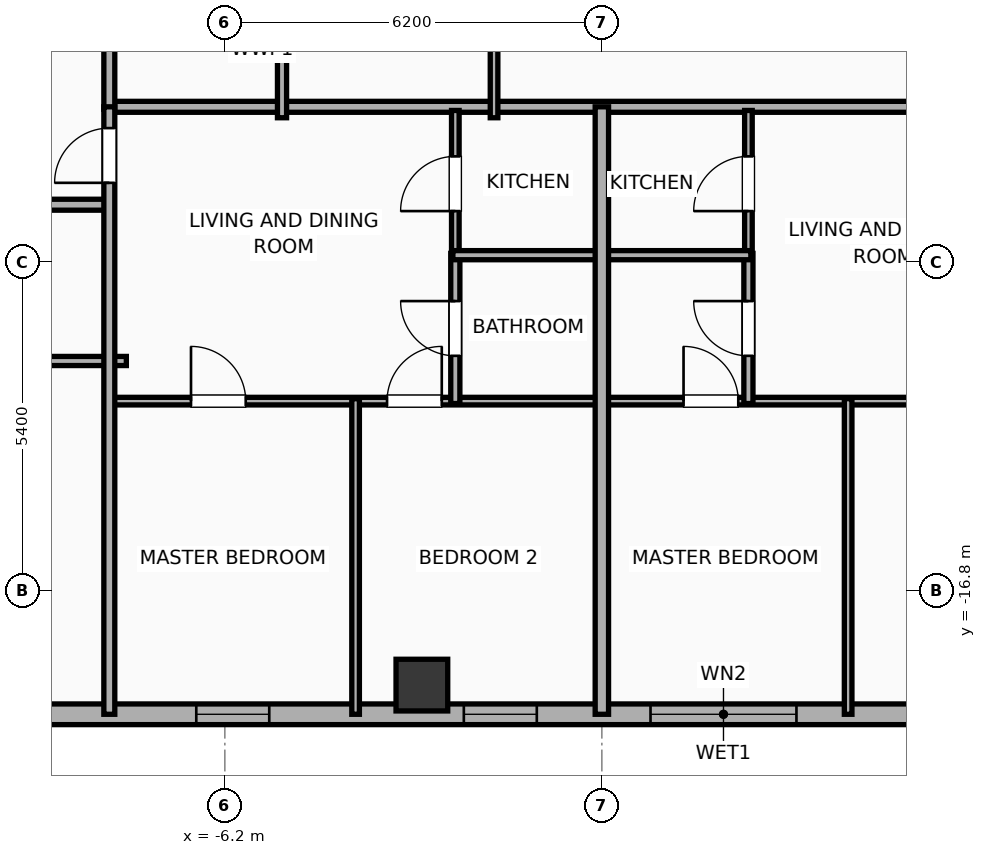
"""IFC4 building model, lengths in metres.
Left out: names, types, materials, properties, quantities, classifications, styles, units other than length and angle.
Written with IfcOpenShell. Run it as: python <this file> out.ifc"""

import sys

from ifc_helpers import new_model, si_unit, direction, frame, frame_2d, origin, origin_2d, place, context, subcontext, project, spatial, rectangle, hollow_rectangle, extrude, element, fill, save


model = new_model("IFC4")
c1 = context("Model", 3, precision=1e-05, world=origin(), true_north=direction((0.0, 1.0)))
c2 = subcontext(c1, "Body", "Model", "MODEL_VIEW")
j1 = project(units=[si_unit("LENGTHUNIT", "METRE"), si_unit("PLANEANGLEUNIT", "RADIAN")], contexts=[c1])
p1 = place(None, origin())
s1 = spatial("IfcSite", under=j1, at=p1, CompositionType="ELEMENT")
p2 = place(p1, origin())
s2 = spatial("IfcBuilding", under=s1, at=p2, CompositionType="ELEMENT")
p3 = place(p2, frame((0.0, 0.0, 227.5)))
s3 = spatial("IfcBuildingStorey", under=s2, at=p3, CompositionType="ELEMENT", Elevation=227.5)
p4 = place(p3, frame((-2.96, -18.35, 0.0), z_axis=(0.0, 0.0, 1.0), x_axis=(1.0, 0.0, 0.0)))
e1 = element("IfcColumn", 1, at=p4, inside=s3, PredefinedType="COLUMN", context=c2, shape_type="SweptSolid", body=[
    extrude(hollow_rectangle(XDim=0.85, YDim=0.85, WallThickness=0.028, at=origin_2d()), origin(), (0.0, 0.0, 1.0), 3.9),
])
p5 = place(p3, frame((26.783, -18.83, 0.0), z_axis=(0.0, 0.0, 1.0), x_axis=(-1.0, 0.0, 0.0)))
e2 = element("IfcWall", 2, at=p5, inside=s3, PredefinedType="ELEMENTEDWALL", context=c2, shape_type="SweptSolid", body=[
    extrude(rectangle(XDim=49.566, YDim=0.34, at=frame_2d((24.783, 0.0))), origin(), (0.0, 0.0, 1.0), 3.65),
])
p6 = place(p5, frame((23.583, 0.0, 0.75)))
e3 = element("IfcOpeningElement", 3, at=p6, cuts=e2, PredefinedType="OPENING", context=c2, shape_type="SweptSolid", body=[
    extrude(rectangle(XDim=2.4, YDim=2.1, at=frame_2d((1.2, 1.05))), frame((0.0, 0.18, 0.0), z_axis=(0.0, -1.0, 0.0), x_axis=(1.0, 0.0, 0.0)), (0.0, 0.0, 1.0), 0.36),
])
p7 = place(p5, frame((41.756, 0.0, 0.75)))
e4 = element("IfcOpeningElement", 4, at=p7, cuts=e2, PredefinedType="OPENING", context=c2, shape_type="SweptSolid", body=[
    extrude(rectangle(XDim=2.4, YDim=2.1, at=frame_2d((1.2, 1.05))), frame((0.0, 0.18, 0.0), z_axis=(0.0, -1.0, 0.0), x_axis=(1.0, 0.0, 0.0)), (0.0, 0.0, 1.0), 0.36),
])
p8 = place(p5, frame((47.222, 0.0, 0.75)))
e5 = element("IfcOpeningElement", 5, at=p8, cuts=e2, PredefinedType="OPENING", context=c2, shape_type="SweptSolid", body=[
    extrude(rectangle(XDim=1.2, YDim=2.05, at=frame_2d((0.6, 1.025))), frame((0.0, 0.18, 0.0), z_axis=(0.0, -1.0, 0.0), x_axis=(1.0, 0.0, 0.0)), (0.0, 0.0, 1.0), 0.36),
])
p9 = place(p5, frame((45.181, 0.0, 0.75)))
e6 = element("IfcOpeningElement", 6, at=p9, cuts=e2, PredefinedType="OPENING", context=c2, shape_type="SweptSolid", body=[
    extrude(rectangle(XDim=1.2, YDim=2.05, at=frame_2d((0.6, 1.025))), frame((0.0, 0.18, 0.0), z_axis=(0.0, -1.0, 0.0), x_axis=(1.0, 0.0, 0.0)), (0.0, 0.0, 1.0), 0.36),
])
p10 = place(p5, frame((37.289, 0.0, 0.75)))
e7 = element("IfcOpeningElement", 7, at=p10, cuts=e2, PredefinedType="OPENING", context=c2, shape_type="SweptSolid", body=[
    extrude(rectangle(XDim=1.2, YDim=2.05, at=frame_2d((0.6, 1.025))), frame((0.0, 0.18, 0.0), z_axis=(0.0, -1.0, 0.0), x_axis=(1.0, 0.0, 0.0)), (0.0, 0.0, 1.0), 0.36),
])
p11 = place(p5, frame((16.115, 0.0, 0.75)))
e8 = element("IfcOpeningElement", 8, at=p11, cuts=e2, PredefinedType="OPENING", context=c2, shape_type="SweptSolid", body=[
    extrude(rectangle(XDim=1.2, YDim=2.05, at=frame_2d((0.6, 1.025))), frame((0.0, 0.18, 0.0), z_axis=(0.0, -1.0, 0.0), x_axis=(1.0, 0.0, 0.0)), (0.0, 0.0, 1.0), 0.36),
])
p12 = place(p5, frame((12.422, 0.0, 0.75)))
e9 = element("IfcOpeningElement", 9, at=p12, cuts=e2, PredefinedType="OPENING", context=c2, shape_type="SweptSolid", body=[
    extrude(rectangle(XDim=1.2, YDim=2.05, at=frame_2d((0.6, 1.025))), frame((0.0, 0.18, 0.0), z_axis=(0.0, -1.0, 0.0), x_axis=(1.0, 0.0, 0.0)), (0.0, 0.0, 1.0), 0.36),
])
p13 = place(p5, frame((8.09, 0.0, 0.75)))
e10 = element("IfcOpeningElement", 10, at=p13, cuts=e2, PredefinedType="OPENING", context=c2, shape_type="SweptSolid", body=[
    extrude(rectangle(XDim=1.2, YDim=2.05, at=frame_2d((0.6, 1.025))), frame((0.0, 0.18, 0.0), z_axis=(0.0, -1.0, 0.0), x_axis=(1.0, 0.0, 0.0)), (0.0, 0.0, 1.0), 0.36),
])
p14 = place(p5, frame((4.637, 0.0, 0.75)))
e11 = element("IfcOpeningElement", 11, at=p14, cuts=e2, PredefinedType="OPENING", context=c2, shape_type="SweptSolid", body=[
    extrude(rectangle(XDim=1.2, YDim=2.05, at=frame_2d((0.6, 1.025))), frame((0.0, 0.18, 0.0), z_axis=(0.0, -1.0, 0.0), x_axis=(1.0, 0.0, 0.0)), (0.0, 0.0, 1.0), 0.36),
])
p15 = place(p5, frame((1.811, 0.0, 0.75)))
e12 = element("IfcOpeningElement", 12, at=p15, cuts=e2, PredefinedType="OPENING", context=c2, shape_type="SweptSolid", body=[
    extrude(rectangle(XDim=1.2, YDim=2.05, at=frame_2d((0.6, 1.025))), frame((0.0, 0.18, 0.0), z_axis=(0.0, -1.0, 0.0), x_axis=(1.0, 0.0, 0.0)), (0.0, 0.0, 1.0), 0.36),
])
p16 = place(p5, frame((32.253, 0.0, 0.75)))
e13 = element("IfcOpeningElement", 13, at=p16, cuts=e2, PredefinedType="OPENING", context=c2, shape_type="SweptSolid", body=[
    extrude(rectangle(XDim=1.2, YDim=2.05, at=frame_2d((0.6, 1.025))), frame((0.0, 0.18, 0.0), z_axis=(0.0, -1.0, 0.0), x_axis=(1.0, 0.0, 0.0)), (0.0, 0.0, 1.0), 0.36),
])
p17 = place(p5, frame((27.853, 0.0, 0.75)))
e14 = element("IfcOpeningElement", 14, at=p17, cuts=e2, PredefinedType="OPENING", context=c2, shape_type="SweptSolid", body=[
    extrude(rectangle(XDim=1.2, YDim=2.05, at=frame_2d((0.6, 1.025))), frame((0.0, 0.18, 0.0), z_axis=(0.0, -1.0, 0.0), x_axis=(1.0, 0.0, 0.0)), (0.0, 0.0, 1.0), 0.36),
])
p18 = place(p5, frame((20.473, 0.0, 0.75)))
e15 = element("IfcOpeningElement", 15, at=p18, cuts=e2, PredefinedType="OPENING", context=c2, shape_type="SweptSolid", body=[
    extrude(rectangle(XDim=1.2, YDim=2.05, at=frame_2d((0.6, 1.025))), frame((0.0, 0.18, 0.0), z_axis=(0.0, -1.0, 0.0), x_axis=(1.0, 0.0, 0.0)), (0.0, 0.0, 1.0), 0.36),
])
p19 = place(p3, frame((-8.15, -8.84, 0.0), z_axis=(0.0, 0.0, 1.0), x_axis=(1.0, 0.0, 0.0)))
e16 = element("IfcWall", 16, at=p19, inside=s3, PredefinedType="PARTITIONING", context=c2, shape_type="SweptSolid", body=[
    extrude(rectangle(XDim=16.3, YDim=0.18, at=frame_2d((8.15, 0.0))), origin(), (0.0, 0.0, 1.0), 3.65),
])
p20 = place(p3, frame((-8.1, -8.88, 0.0), z_axis=(0.0, 0.0, 1.0), x_axis=(0.0, 1.0, 0.0)))
e17 = element("IfcWall", 17, at=p20, inside=s3, PredefinedType="PARTITIONING", context=c2, shape_type="SweptSolid", body=[
    extrude(rectangle(XDim=17.76, YDim=0.18, at=frame_2d((8.88, 0.0))), origin(), (0.0, 0.0, 1.0), 3.65),
])
p21 = place(p20, frame((1.276, 0.0, 0.0)))
e18 = element("IfcOpeningElement", 18, at=p21, cuts=e17, PredefinedType="OPENING", context=c2, shape_type="SweptSolid", body=[
    extrude(rectangle(XDim=1.0, YDim=2.05, at=frame_2d((0.5, 1.025))), frame((0.0, 0.1, 0.0), z_axis=(0.0, -1.0, 0.0), x_axis=(1.0, 0.0, 0.0)), (0.0, 0.0, 1.0), 0.2),
])
p22 = place(p20, frame((10.181, 0.0, 0.0)))
e19 = element("IfcOpeningElement", 19, at=p22, cuts=e17, PredefinedType="OPENING", context=c2, shape_type="SweptSolid", body=[
    extrude(rectangle(XDim=0.95, YDim=2.05, at=frame_2d((0.475, 1.025))), frame((0.0, 0.1, 0.0), z_axis=(0.0, -1.0, 0.0), x_axis=(1.0, 0.0, 0.0)), (0.0, 0.0, 1.0), 0.2),
])
p23 = place(p3, frame((-5.26, -9.02, 0.0), z_axis=(0.0, 0.0, 1.0), x_axis=(0.0, 1.0, 0.0)))
e20 = element("IfcWall", 20, at=p23, inside=s3, PredefinedType="PLUMBINGWALL", context=c2, shape_type="SweptSolid", body=[
    extrude(rectangle(XDim=3.35, YDim=0.15, at=frame_2d((1.675, 0.0))), origin(), (0.0, 0.0, 1.0), 3.65),
])
p24 = place(p3, frame((-1.773, -9.02, 0.0), z_axis=(0.0, 0.0, 1.0), x_axis=(0.0, 1.0, 0.0)))
e21 = element("IfcWall", 21, at=p24, inside=s3, PredefinedType="PARTITIONING", context=c2, shape_type="SweptSolid", body=[
    extrude(rectangle(XDim=17.99, YDim=0.125, at=frame_2d((8.995, 0.0))), origin(), (0.0, 0.0, 1.0), 3.65),
])
p25 = place(p24, frame((8.52, 0.0, 0.0)))
e22 = element("IfcOpeningElement", 22, at=p25, cuts=e21, PredefinedType="OPENING", context=c2, shape_type="SweptSolid", body=[
    extrude(rectangle(XDim=0.95, YDim=2.05, at=frame_2d((0.475, 1.025))), frame((0.0, 0.073, 0.0), z_axis=(0.0, -1.0, 0.0), x_axis=(1.0, 0.0, 0.0)), (0.0, 0.0, 1.0), 0.145),
])
p26 = place(p3, frame((-10.217, -13.02, 0.0), z_axis=(0.0, 0.0, 1.0), x_axis=(1.0, 0.0, 0.0)))
e23 = element("IfcWall", 23, at=p26, inside=s3, PredefinedType="PLUMBINGWALL", context=c2, shape_type="SweptSolid", body=[
    extrude(rectangle(XDim=2.397, YDim=0.15, at=frame_2d((1.198, 0.0))), origin(), (0.0, 0.0, 1.0), 3.65),
])
p27 = place(p3, frame((-26.23, -10.45, 0.0), z_axis=(0.0, 0.0, 1.0), x_axis=(1.0, 0.0, 0.0)))
e24 = element("IfcWall", 24, at=p27, inside=s3, PredefinedType="PARTITIONING", context=c2, shape_type="SweptSolid", body=[
    extrude(rectangle(XDim=18.15, YDim=0.18, at=frame_2d((9.075, 0.0))), origin(), (0.0, 0.0, 1.0), 3.65),
])
p28 = place(p27, frame((2.659, 0.0, 0.0)))
e25 = element("IfcOpeningElement", 25, at=p28, cuts=e24, PredefinedType="OPENING", context=c2, shape_type="SweptSolid", body=[
    extrude(rectangle(XDim=0.9, YDim=2.05, at=frame_2d((0.45, 1.025))), frame((0.0, 0.1, 0.0), z_axis=(0.0, -1.0, 0.0), x_axis=(1.0, 0.0, 0.0)), (0.0, 0.0, 1.0), 0.2),
])
p29 = place(p27, frame((9.654, 0.0, 0.0)))
e26 = element("IfcOpeningElement", 26, at=p29, cuts=e24, PredefinedType="OPENING", context=c2, shape_type="SweptSolid", body=[
    extrude(rectangle(XDim=1.15, YDim=2.05, at=frame_2d((0.575, 1.025))), frame((0.0, 0.1, 0.0), z_axis=(0.0, -1.0, 0.0), x_axis=(1.0, 0.0, 0.0)), (0.0, 0.0, 1.0), 0.2),
])
p30 = place(p27, frame((14.792, 0.0, 0.0)))
e27 = element("IfcOpeningElement", 27, at=p30, cuts=e24, PredefinedType="OPENING", context=c2, shape_type="SweptSolid", body=[
    extrude(rectangle(XDim=0.9, YDim=2.05, at=frame_2d((0.45, 1.025))), frame((0.0, 0.1, 0.0), z_axis=(0.0, -1.0, 0.0), x_axis=(1.0, 0.0, 0.0)), (0.0, 0.0, 1.0), 0.2),
])
p31 = place(p3, frame((-8.08, -13.68, 0.0), z_axis=(0.0, 0.0, 1.0), x_axis=(1.0, 0.0, 0.0)))
e28 = element("IfcWall", 28, at=p31, inside=s3, PredefinedType="PARTITIONING", context=c2, shape_type="SweptSolid", body=[
    extrude(rectangle(XDim=8.06, YDim=0.125, at=frame_2d((4.03, 0.0))), origin(), (0.0, 0.0, 1.0), 3.65),
])
p32 = place(p31, frame((1.323, 0.0, 0.0)))
e29 = element("IfcOpeningElement", 29, at=p32, cuts=e28, PredefinedType="OPENING", context=c2, shape_type="SweptSolid", body=[
    extrude(rectangle(XDim=0.9, YDim=2.05, at=frame_2d((0.45, 1.025))), frame((0.0, 0.073, 0.0), z_axis=(0.0, -1.0, 0.0), x_axis=(1.0, 0.0, 0.0)), (0.0, 0.0, 1.0), 0.145),
])
p33 = place(p31, frame((4.547, 0.0, 0.0)))
e30 = element("IfcOpeningElement", 30, at=p33, cuts=e28, PredefinedType="OPENING", context=c2, shape_type="SweptSolid", body=[
    extrude(rectangle(XDim=0.9, YDim=2.05, at=frame_2d((0.45, 1.025))), frame((0.0, 0.073, 0.0), z_axis=(0.0, -1.0, 0.0), x_axis=(1.0, 0.0, 0.0)), (0.0, 0.0, 1.0), 0.145),
])
p34 = place(p3, frame((-2.41, -11.31, 0.0), z_axis=(0.0, 0.0, 1.0), x_axis=(0.0, 1.0, 0.0)))
e31 = element("IfcWall", 31, at=p34, inside=s3, PredefinedType="PARTITIONING", context=c2, shape_type="SweptSolid", body=[
    extrude(rectangle(XDim=2.41, YDim=0.125, at=frame_2d((1.205, 0.0))), origin(), (0.0, 0.0, 1.0), 3.65),
])
p35 = place(p34, frame((0.755, 0.0, 0.0)))
e32 = element("IfcOpeningElement", 32, at=p35, cuts=e31, PredefinedType="OPENING", context=c2, shape_type="SweptSolid", body=[
    extrude(rectangle(XDim=0.9, YDim=2.05, at=frame_2d((0.45, 1.025))), frame((0.0, 0.073, 0.0), z_axis=(0.0, -1.0, 0.0), x_axis=(1.0, 0.0, 0.0)), (0.0, 0.0, 1.0), 0.145),
])
p36 = place(p3, frame((-2.41, -13.72, 0.0), z_axis=(0.0, 0.0, 1.0), x_axis=(0.0, 1.0, 0.0)))
e33 = element("IfcWall", 33, at=p36, inside=s3, PredefinedType="PLUMBINGWALL", context=c2, shape_type="SweptSolid", body=[
    extrude(rectangle(XDim=2.47, YDim=0.15, at=frame_2d((1.235, 0.0))), origin(), (0.0, 0.0, 1.0), 3.65),
])
p37 = place(p36, frame((0.785, 0.0, 0.0)))
e34 = element("IfcOpeningElement", 34, at=p37, cuts=e33, PredefinedType="OPENING", context=c2, shape_type="SweptSolid", body=[
    extrude(rectangle(XDim=0.9, YDim=2.05, at=frame_2d((0.45, 1.025))), frame((0.0, 0.085, 0.0), z_axis=(0.0, -1.0, 0.0), x_axis=(1.0, 0.0, 0.0)), (0.0, 0.0, 1.0), 0.17),
])
p38 = place(p3, frame((-2.45, -11.28, 0.0), z_axis=(0.0, 0.0, 1.0), x_axis=(1.0, 0.0, 0.0)))
e35 = element("IfcWall", 35, at=p38, inside=s3, PredefinedType="PLUMBINGWALL", context=c2, shape_type="SweptSolid", body=[
    extrude(rectangle(XDim=2.43, YDim=0.15, at=frame_2d((1.215, 0.0))), origin(), (0.0, 0.0, 1.0), 3.65),
])
p39 = place(p3, frame((-4.05, -18.83, 0.0), z_axis=(0.0, 0.0, 1.0), x_axis=(0.0, 1.0, 0.0)))
e36 = element("IfcWall", 36, at=p39, inside=s3, PredefinedType="PARTITIONING", context=c2, shape_type="SweptSolid", body=[
    extrude(rectangle(XDim=5.19, YDim=0.125, at=frame_2d((2.595, 0.0))), origin(), (0.0, 0.0, 1.0), 3.65),
])
p40 = place(p3, frame((-8.1, -18.83, 0.0), z_axis=(0.0, 0.0, 1.0), x_axis=(0.0, 1.0, 0.0)))
e37 = element("IfcWall", 37, at=p40, inside=s3, PredefinedType="PARTITIONING", context=c2, shape_type="SweptSolid", body=[
    extrude(rectangle(XDim=9.99, YDim=0.18, at=frame_2d((4.995, 0.0))), origin(), (0.0, 0.0, 1.0), 3.65),
])
p41 = place(p40, frame((8.74, 0.0, 0.0)))
e38 = element("IfcOpeningElement", 38, at=p41, cuts=e37, PredefinedType="OPENING", context=c2, shape_type="SweptSolid", body=[
    extrude(rectangle(XDim=0.9, YDim=2.05, at=frame_2d((0.45, 1.025))), frame((0.0, 0.1, 0.0), z_axis=(0.0, -1.0, 0.0), x_axis=(1.0, 0.0, 0.0)), (0.0, 0.0, 1.0), 0.2),
])
p42 = place(p3, frame((0.02, -13.68, 0.0), z_axis=(0.0, 0.0, 1.0), x_axis=(1.0, 0.0, 0.0)))
e39 = element("IfcWall", 39, at=p42, inside=s3, PredefinedType="PARTITIONING", context=c2, shape_type="SweptSolid", body=[
    extrude(rectangle(XDim=8.06, YDim=0.125, at=frame_2d((4.03, 0.0))), origin(), (0.0, 0.0, 1.0), 3.65),
])
p43 = place(p42, frame((1.323, 0.0, 0.0)))
e40 = element("IfcOpeningElement", 40, at=p43, cuts=e39, PredefinedType="OPENING", context=c2, shape_type="SweptSolid", body=[
    extrude(rectangle(XDim=0.9, YDim=2.05, at=frame_2d((0.45, 1.025))), frame((0.0, 0.073, 0.0), z_axis=(0.0, -1.0, 0.0), x_axis=(1.0, 0.0, 0.0)), (0.0, 0.0, 1.0), 0.145),
])
p44 = place(p42, frame((5.837, 0.0, 0.0)))
e41 = element("IfcOpeningElement", 41, at=p44, cuts=e39, PredefinedType="OPENING", context=c2, shape_type="SweptSolid", body=[
    extrude(rectangle(XDim=0.9, YDim=2.05, at=frame_2d((0.45, 1.025))), frame((0.0, 0.073, 0.0), z_axis=(0.0, -1.0, 0.0), x_axis=(1.0, 0.0, 0.0)), (0.0, 0.0, 1.0), 0.145),
])
p45 = place(p3, frame((2.41, -11.31, 0.0), z_axis=(0.0, 0.0, 1.0), x_axis=(0.0, 1.0, 0.0)))
e42 = element("IfcWall", 42, at=p45, inside=s3, PredefinedType="PARTITIONING", context=c2, shape_type="SweptSolid", body=[
    extrude(rectangle(XDim=2.41, YDim=0.125, at=frame_2d((1.205, 0.0))), origin(), (0.0, 0.0, 1.0), 3.65),
])
p46 = place(p45, frame((0.755, 0.0, 0.0)))
e43 = element("IfcOpeningElement", 43, at=p46, cuts=e42, PredefinedType="OPENING", context=c2, shape_type="SweptSolid", body=[
    extrude(rectangle(XDim=0.9, YDim=2.05, at=frame_2d((0.45, 1.025))), frame((0.0, 0.073, 0.0), z_axis=(0.0, -1.0, 0.0), x_axis=(1.0, 0.0, 0.0)), (0.0, 0.0, 1.0), 0.145),
])
p47 = place(p3, frame((2.41, -13.72, 0.0), z_axis=(0.0, 0.0, 1.0), x_axis=(0.0, 1.0, 0.0)))
e44 = element("IfcWall", 44, at=p47, inside=s3, PredefinedType="PLUMBINGWALL", context=c2, shape_type="SweptSolid", body=[
    extrude(rectangle(XDim=2.47, YDim=0.15, at=frame_2d((1.235, 0.0))), origin(), (0.0, 0.0, 1.0), 3.65),
])
p48 = place(p47, frame((0.785, 0.0, 0.0)))
e45 = element("IfcOpeningElement", 45, at=p48, cuts=e44, PredefinedType="OPENING", context=c2, shape_type="SweptSolid", body=[
    extrude(rectangle(XDim=0.9, YDim=2.05, at=frame_2d((0.45, 1.025))), frame((0.0, 0.085, 0.0), z_axis=(0.0, -1.0, 0.0), x_axis=(1.0, 0.0, 0.0)), (0.0, 0.0, 1.0), 0.17),
])
p49 = place(p3, frame((0.02, -11.28, 0.0), z_axis=(0.0, 0.0, 1.0), x_axis=(1.0, 0.0, 0.0)))
e46 = element("IfcWall", 46, at=p49, inside=s3, PredefinedType="PLUMBINGWALL", context=c2, shape_type="SweptSolid", body=[
    extrude(rectangle(XDim=2.43, YDim=0.15, at=frame_2d((1.215, 0.0))), origin(), (0.0, 0.0, 1.0), 3.65),
])
p50 = place(p3, frame((4.05, -18.83, 0.0), z_axis=(0.0, 0.0, 1.0), x_axis=(0.0, 1.0, 0.0)))
e47 = element("IfcWall", 47, at=p50, inside=s3, PredefinedType="PARTITIONING", context=c2, shape_type="SweptSolid", body=[
    extrude(rectangle(XDim=5.19, YDim=0.125, at=frame_2d((2.595, 0.0))), origin(), (0.0, 0.0, 1.0), 3.65),
])
p51 = place(p3, frame((0.0, -18.83, 0.0), z_axis=(0.0, 0.0, 1.0), x_axis=(0.0, 1.0, 0.0)))
e48 = element("IfcWall", 48, at=p51, inside=s3, PredefinedType="PARTITIONING", context=c2, shape_type="SweptSolid", body=[
    extrude(rectangle(XDim=9.99, YDim=0.22, at=frame_2d((4.995, 0.0))), origin(), (0.0, 0.0, 1.0), 3.65),
])
p52 = place(p6, origin())
e49 = element("IfcWindow", 49, at=p52, inside=s3, PartitioningType="SINGLE_PANEL", PredefinedType="WINDOW", context=c2, shape_type="SweptSolid", body=[
    extrude(rectangle(XDim=2.4, YDim=2.1, at=frame_2d((1.2, 1.05))), frame((0.0, 0.03, 0.0), z_axis=(0.0, -1.0, 0.0), x_axis=(1.0, 0.0, 0.0)), (0.0, 0.0, 1.0), 0.06),
])
fill(e3, e49)
p53 = place(p16, origin())
e50 = element("IfcWindow", 50, at=p53, inside=s3, PartitioningType="SINGLE_PANEL", PredefinedType="WINDOW", context=c2, shape_type="SweptSolid", body=[
    extrude(rectangle(XDim=1.2, YDim=2.05, at=frame_2d((0.6, 1.025))), frame((0.0, 0.03, 0.0), z_axis=(0.0, -1.0, 0.0), x_axis=(1.0, 0.0, 0.0)), (0.0, 0.0, 1.0), 0.06),
])
fill(e13, e50)
p54 = place(p17, origin())
e51 = element("IfcWindow", 51, at=p54, inside=s3, PartitioningType="SINGLE_PANEL", PredefinedType="WINDOW", context=c2, shape_type="SweptSolid", body=[
    extrude(rectangle(XDim=1.2, YDim=2.05, at=frame_2d((0.6, 1.025))), frame((0.0, 0.03, 0.0), z_axis=(0.0, -1.0, 0.0), x_axis=(1.0, 0.0, 0.0)), (0.0, 0.0, 1.0), 0.06),
])
fill(e14, e51)
p55 = place(p32, origin())
e52 = element("IfcDoor", 52, at=p55, inside=s3, OperationType="SINGLE_SWING_LEFT", PredefinedType="DOOR", context=c2, shape_type="SweptSolid", body=[
    extrude(rectangle(XDim=0.9, YDim=2.05, at=frame_2d((0.45, 1.025))), frame((0.0, 0.025, 0.0), z_axis=(0.0, -1.0, 0.0), x_axis=(1.0, 0.0, 0.0)), (0.0, 0.0, 1.0), 0.05),
])
fill(e29, e52)
p56 = place(p33, origin())
e53 = element("IfcDoor", 53, at=p56, inside=s3, OperationType="SINGLE_SWING_RIGHT", PredefinedType="DOOR", context=c2, shape_type="SweptSolid", body=[
    extrude(rectangle(XDim=0.9, YDim=2.05, at=frame_2d((0.45, 1.025))), frame((0.0, 0.025, 0.0), z_axis=(0.0, -1.0, 0.0), x_axis=(1.0, 0.0, 0.0)), (0.0, 0.0, 1.0), 0.05),
])
fill(e30, e53)
p57 = place(p35, origin())
e54 = element("IfcDoor", 54, at=p57, inside=s3, OperationType="SINGLE_SWING_LEFT", PredefinedType="DOOR", context=c2, shape_type="SweptSolid", body=[
    extrude(rectangle(XDim=0.9, YDim=2.05, at=frame_2d((0.45, 1.025))), frame((0.0, 0.025, 0.0), z_axis=(0.0, -1.0, 0.0), x_axis=(1.0, 0.0, 0.0)), (0.0, 0.0, 1.0), 0.05),
])
fill(e32, e54)
p58 = place(p37, origin())
e55 = element("IfcDoor", 55, at=p58, inside=s3, OperationType="SINGLE_SWING_RIGHT", PredefinedType="DOOR", context=c2, shape_type="SweptSolid", body=[
    extrude(rectangle(XDim=0.9, YDim=2.05, at=frame_2d((0.45, 1.025))), frame((0.0, 0.025, 0.0), z_axis=(0.0, -1.0, 0.0), x_axis=(1.0, 0.0, 0.0)), (0.0, 0.0, 1.0), 0.05),
])
fill(e34, e55)
p59 = place(p41, origin())
e56 = element("IfcDoor", 56, at=p59, inside=s3, OperationType="SINGLE_SWING_LEFT", PredefinedType="DOOR", context=c2, shape_type="SweptSolid", body=[
    extrude(rectangle(XDim=0.9, YDim=2.05, at=frame_2d((0.45, 1.025))), frame((0.0, 0.025, 0.0), z_axis=(0.0, -1.0, 0.0), x_axis=(1.0, 0.0, 0.0)), (0.0, 0.0, 1.0), 0.05),
])
fill(e38, e56)
p60 = place(p43, origin())
e57 = element("IfcDoor", 57, at=p60, inside=s3, OperationType="SINGLE_SWING_LEFT", PredefinedType="DOOR", context=c2, shape_type="SweptSolid", body=[
    extrude(rectangle(XDim=0.9, YDim=2.05, at=frame_2d((0.45, 1.025))), frame((0.0, 0.025, 0.0), z_axis=(0.0, -1.0, 0.0), x_axis=(1.0, 0.0, 0.0)), (0.0, 0.0, 1.0), 0.05),
])
fill(e40, e57)
p61 = place(p46, origin())
e58 = element("IfcDoor", 58, at=p61, inside=s3, OperationType="SINGLE_SWING_LEFT", PredefinedType="DOOR", context=c2, shape_type="SweptSolid", body=[
    extrude(rectangle(XDim=0.9, YDim=2.05, at=frame_2d((0.45, 1.025))), frame((0.0, 0.025, 0.0), z_axis=(0.0, -1.0, 0.0), x_axis=(1.0, 0.0, 0.0)), (0.0, 0.0, 1.0), 0.05),
])
fill(e43, e58)
p62 = place(p48, origin())
e59 = element("IfcDoor", 59, at=p62, inside=s3, OperationType="SINGLE_SWING_RIGHT", PredefinedType="DOOR", context=c2, shape_type="SweptSolid", body=[
    extrude(rectangle(XDim=0.9, YDim=2.05, at=frame_2d((0.45, 1.025))), frame((0.0, 0.025, 0.0), z_axis=(0.0, -1.0, 0.0), x_axis=(1.0, 0.0, 0.0)), (0.0, 0.0, 1.0), 0.05),
])
fill(e45, e59)
save(model, sys.argv[1])
